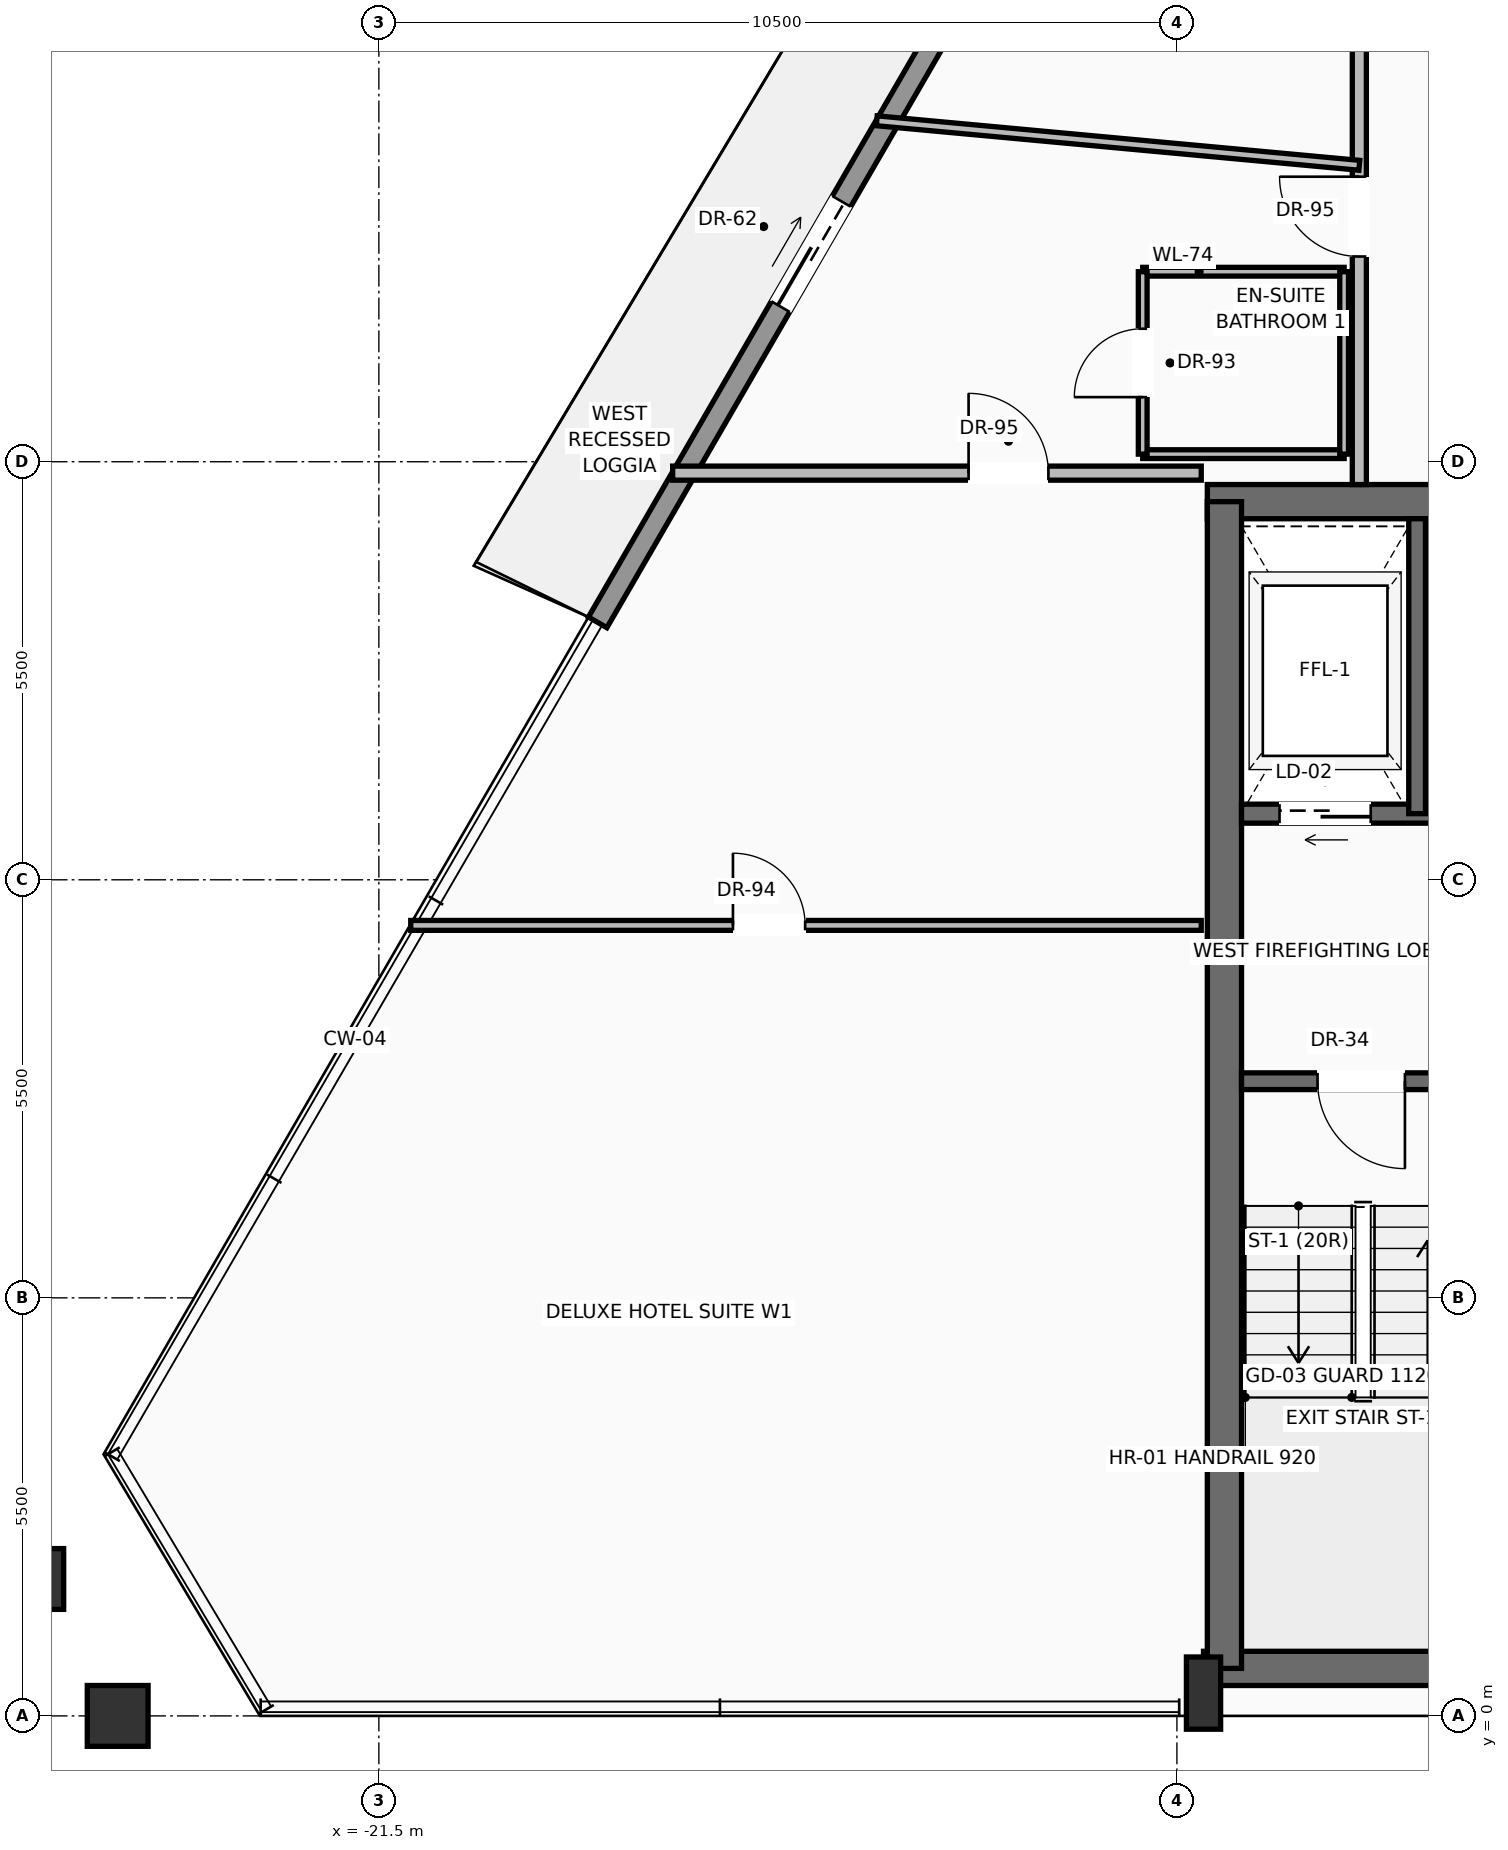
"""IFC4 building model, lengths in metres.
Left out: names, types, materials, properties, quantities, classifications, styles, units other than length and angle.
Written with IfcOpenShell. Run it as: python <this file> out.ifc"""

import sys

from ifc_helpers import new_model, si_unit, direction, frame, frame_2d, origin, origin_2d, place, context, subcontext, project, spatial, rectangle, hollow_rectangle, extrude, source, transform, mapped, element, fill, save


model = new_model("IFC4")
c1 = context("Model", 3, precision=1e-05, world=origin(), true_north=direction((0.0, 1.0)))
c2 = subcontext(c1, "Body", "Model", "MODEL_VIEW")
j1 = project(units=[si_unit("LENGTHUNIT", "METRE"), si_unit("PLANEANGLEUNIT", "RADIAN")], contexts=[c1])
p1 = place(None, origin())
s1 = spatial("IfcSite", under=j1, at=p1, CompositionType="ELEMENT")
p2 = place(p1, origin())
s2 = spatial("IfcBuilding", under=s1, at=p2, CompositionType="ELEMENT")
p3 = place(p2, frame((0.0, 0.0, 269.55)))
s3 = spatial("IfcBuildingStorey", under=s2, at=p3, CompositionType="ELEMENT", Elevation=269.55)
p4 = place(p3, frame((-10.65, 0.625, 0.0), z_axis=(0.0, 0.0, 1.0), x_axis=(1.0, 0.0, 0.0)))
e1 = element("IfcWall", 1, at=p4, inside=s3, PredefinedType="SHEAR", context=c2, shape_type="SweptSolid", body=[
    extrude(rectangle(XDim=21.3, YDim=0.45, at=frame_2d((10.65, 0.0))), origin(), (0.0, 0.0, 1.0), 3.24),
])
p5 = place(p3, frame((-10.6, 15.975, 0.0), z_axis=(0.0, 0.0, 1.0), x_axis=(1.0, 0.0, 0.0)))
e2 = element("IfcWall", 2, at=p5, inside=s3, PredefinedType="SHEAR", context=c2, shape_type="SweptSolid", body=[
    extrude(rectangle(XDim=21.2, YDim=0.45, at=frame_2d((10.6, 0.0))), origin(), (0.0, 0.0, 1.0), 3.24),
])
p6 = place(p5, frame((3.17, 0.0, 0.0)))
e3 = element("IfcOpeningElement", 3, at=p6, cuts=e2, PredefinedType="OPENING", context=c2, shape_type="SweptSolid", body=[
    extrude(rectangle(XDim=1.3, YDim=2.3, at=frame_2d((0.65, 1.15))), frame((0.0, 0.235, 0.0), z_axis=(0.0, -1.0, 0.0), x_axis=(1.0, 0.0, 0.0)), (0.0, 0.0, 1.0), 0.47),
])
p7 = place(p5, frame((9.6, 0.0, 0.0)))
e4 = element("IfcOpeningElement", 4, at=p7, cuts=e2, PredefinedType="OPENING", context=c2, shape_type="SweptSolid", body=[
    extrude(rectangle(XDim=2.0, YDim=2.4, at=frame_2d((1.0, 1.2))), frame((0.0, 0.235, 0.0), z_axis=(0.0, -1.0, 0.0), x_axis=(1.0, 0.0, 0.0)), (0.0, 0.0, 1.0), 0.47),
])
p8 = place(p3, frame((-10.375, 0.625, 0.0), z_axis=(0.0, 0.0, 1.0), x_axis=(0.0, 1.0, 0.0)))
e5 = element("IfcWall", 5, at=p8, inside=s3, PredefinedType="SHEAR", context=c2, shape_type="SweptSolid", body=[
    extrude(rectangle(XDim=15.35, YDim=0.45, at=frame_2d((7.675, 0.0))), origin(), (0.0, 0.0, 1.0), 3.24),
])
m1 = source(origin(), c2, "Body", "SweptSolid", [
    extrude(rectangle(XDim=0.45, YDim=0.95, at=origin_2d()), origin(), (0.0, 0.0, 1.0), 3.45),
])
p9 = place(p3, frame((-10.65, 0.3, 0.0), z_axis=(0.0, 0.0, 1.0), x_axis=(1.0, 0.0, 0.0)))
e6 = element("IfcColumn", 6, at=p9, inside=s3, PredefinedType="PILASTER", context=c2, shape_type="MappedRepresentation", body=[
    mapped(m1, transform((0.0, 0.0, 0.0), scale=1.0)),
])
m2 = source(origin(), c2, "Body", "SweptSolid", [
    extrude(hollow_rectangle(XDim=0.8, YDim=0.8, WallThickness=0.04, at=origin_2d()), origin(), (0.0, 0.0, 1.0), 3.441),
])
p10 = place(p3, frame((-24.936, 0.0, 0.004), z_axis=(0.0003547357, 0.0, 0.999999937081), x_axis=(1.0, 0.0, 0.0)))
e7 = element("IfcColumn", 7, at=p10, inside=s3, PredefinedType="COLUMN", context=c2, shape_type="MappedRepresentation", body=[
    mapped(m2, transform((0.0, 0.0, 0.0), scale=1.0)),
])
m3 = source(origin(), c2, "Body", "SweptSolid", [
    extrude(hollow_rectangle(XDim=0.8, YDim=0.8, WallThickness=0.04, at=origin_2d()), origin(), (0.0, 0.0, 1.0), 3.442),
])
p11 = place(p3, frame((-26.047, 1.801, 0.004), z_axis=(0.011845709499, -0.016598179777, 0.999792068179), x_axis=(0.8139684383, 0.580909099129, 0.0)))
e8 = element("IfcColumn", 8, at=p11, inside=s3, PredefinedType="COLUMN", context=c2, shape_type="MappedRepresentation", body=[
    mapped(m3, transform((0.0, 0.0, 0.0), scale=1.0)),
])
p12 = place(p3, frame((-18.621, 14.387, 0.0), z_axis=(0.0, 0.0, 1.0), x_axis=(0.501208020252, 0.865326828681, 0.0)))
e9 = element("IfcWall", 9, at=p12, inside=s3, PredefinedType="SOLIDWALL", context=c2, shape_type="SweptSolid", body=[
    extrude(rectangle(XDim=20.003, YDim=0.28, at=frame_2d((10.001, 0.0))), origin(), (0.0, 0.0, 1.0), 2.82),
])
p13 = place(p12, frame((4.801, 0.0, 0.0)))
e10 = element("IfcOpeningElement", 10, at=p13, cuts=e9, PredefinedType="OPENING", context=c2, shape_type="SweptSolid", body=[
    extrude(rectangle(XDim=1.6, YDim=2.35, at=frame_2d((0.8, 1.175))), frame((0.0, 0.15, 0.0), z_axis=(0.0, -1.0, 0.0), x_axis=(1.0, 0.0, 0.0)), (0.0, 0.0, 1.0), 0.3),
])
p14 = place(p12, frame((13.602, 0.0, 0.9)))
e11 = element("IfcOpeningElement", 11, at=p14, cuts=e9, PredefinedType="OPENING", context=c2, shape_type="SweptSolid", body=[
    extrude(rectangle(XDim=2.0, YDim=1.75, at=frame_2d((1.0, 0.875))), frame((0.0, 0.15, 0.0), z_axis=(0.0, -1.0, 0.0), x_axis=(1.0, 0.0, 0.0)), (0.0, 0.0, 1.0), 0.3),
])
p15 = place(p3, frame((-5.5, 8.35, 0.0), z_axis=(0.0, 0.0, 1.0), x_axis=(-1.0, 0.0, 0.0)))
e12 = element("IfcWall", 12, at=p15, inside=s3, PredefinedType="SOLIDWALL", context=c2, shape_type="SweptSolid", body=[
    extrude(rectangle(XDim=4.65, YDim=0.22, at=frame_2d((2.325, 0.0))), origin(), (0.0, 0.0, 1.0), 3.24),
])
p16 = place(p15, frame((2.5, 0.0, 0.0)))
e13 = element("IfcOpeningElement", 13, at=p16, cuts=e12, PredefinedType="OPENING", context=c2, shape_type="SweptSolid", body=[
    extrude(rectangle(XDim=1.15, YDim=2.2, at=frame_2d((0.575, 1.1))), frame((0.0, 0.12, 0.0), z_axis=(0.0, -1.0, 0.0), x_axis=(1.0, 0.0, 0.0)), (0.0, 0.0, 1.0), 0.24),
])
p17 = place(p3, frame((-5.5, 11.87, 0.0), z_axis=(0.0, 0.0, 1.0), x_axis=(-1.0, 0.0, 0.0)))
e14 = element("IfcWall", 14, at=p17, inside=s3, PredefinedType="SOLIDWALL", context=c2, shape_type="SweptSolid", body=[
    extrude(rectangle(XDim=4.65, YDim=0.25, at=frame_2d((2.325, 0.0))), origin(), (0.0, 0.0, 1.0), 3.24),
])
p18 = place(p17, frame((2.95, 0.0, 0.0)))
e15 = element("IfcOpeningElement", 15, at=p18, cuts=e14, PredefinedType="OPENING", context=c2, shape_type="SweptSolid", body=[
    extrude(rectangle(XDim=1.2, YDim=2.25, at=frame_2d((0.6, 1.125))), frame((0.0, 0.135, 0.0), z_axis=(0.0, -1.0, 0.0), x_axis=(1.0, 0.0, 0.0)), (0.0, 0.0, 1.0), 0.27),
])
p19 = place(p3, frame((-7.84, 11.87, 0.0), z_axis=(0.0, 0.0, 1.0), x_axis=(0.0, 1.0, 0.0)))
e16 = element("IfcWall", 16, at=p19, inside=s3, PredefinedType="SOLIDWALL", context=c2, shape_type="SweptSolid", body=[
    extrude(rectangle(XDim=3.88, YDim=0.22, at=frame_2d((1.94, 0.0))), origin(), (0.0, 0.0, 1.0), 3.24),
])
p20 = place(p3, frame((-8.6, 16.2, 0.0), z_axis=(0.0, 0.0, 1.0), x_axis=(0.0, 1.0, 0.0)))
e17 = element("IfcWall", 17, at=p20, inside=s3, PredefinedType="PARTITIONING", context=c2, shape_type="SweptSolid", body=[
    extrude(rectangle(XDim=13.8, YDim=0.185, at=frame_2d((6.9, 0.0))), origin(), (0.0, 0.0, 1.0), 3.232),
])
p21 = place(p20, frame((3.0, 0.0, 0.0)))
e18 = element("IfcOpeningElement", 18, at=p21, cuts=e17, PredefinedType="OPENING", context=c2, shape_type="SweptSolid", body=[
    extrude(rectangle(XDim=1.05, YDim=2.25, at=frame_2d((0.525, 1.125))), frame((0.0, 0.103, 0.0), z_axis=(0.0, -1.0, 0.0), x_axis=(1.0, 0.0, 0.0)), (0.0, 0.0, 1.0), 0.205),
])
p22 = place(p20, frame((7.088, 0.0, 0.0)))
e19 = element("IfcOpeningElement", 19, at=p22, cuts=e17, PredefinedType="OPENING", context=c2, shape_type="SweptSolid", body=[
    extrude(rectangle(XDim=1.05, YDim=2.25, at=frame_2d((0.525, 1.125))), frame((0.0, 0.103, 0.0), z_axis=(0.0, -1.0, 0.0), x_axis=(1.0, 0.0, 0.0)), (0.0, 0.0, 1.0), 0.205),
])
p23 = place(p3, frame((-17.635, 16.35, 0.0), z_axis=(0.0, 0.0, 1.0), x_axis=(1.0, 0.0, 0.0)))
e20 = element("IfcWall", 20, at=p23, inside=s3, PredefinedType="PARTITIONING", context=c2, shape_type="SweptSolid", body=[
    extrude(rectangle(XDim=6.955, YDim=0.185, at=frame_2d((3.477, 0.0))), origin(), (0.0, 0.0, 1.0), 3.232),
])
p24 = place(p23, frame((3.893, 0.0, 0.0)))
e21 = element("IfcOpeningElement", 21, at=p24, cuts=e20, PredefinedType="OPENING", context=c2, shape_type="SweptSolid", body=[
    extrude(rectangle(XDim=1.05, YDim=2.25, at=frame_2d((0.525, 1.125))), frame((0.0, 0.103, 0.0), z_axis=(0.0, -1.0, 0.0), x_axis=(1.0, 0.0, 0.0)), (0.0, 0.0, 1.0), 0.205),
])
p25 = place(p3, frame((-21.081, 10.4, 0.0), z_axis=(0.0, 0.0, 1.0), x_axis=(1.0, 0.0, 0.0)))
e22 = element("IfcWall", 22, at=p25, inside=s3, PredefinedType="PARTITIONING", context=c2, shape_type="SweptSolid", body=[
    extrude(rectangle(XDim=10.401, YDim=0.13, at=frame_2d((5.2, 0.0))), origin(), (0.0, 0.0, 1.0), 3.232),
])
p26 = place(p25, frame((4.239, 0.0, 0.0)))
e23 = element("IfcOpeningElement", 23, at=p26, cuts=e22, PredefinedType="OPENING", context=c2, shape_type="SweptSolid", body=[
    extrude(rectangle(XDim=0.95, YDim=2.2, at=frame_2d((0.475, 1.1))), frame((0.0, 0.075, 0.0), z_axis=(0.0, -1.0, 0.0), x_axis=(1.0, 0.0, 0.0)), (0.0, 0.0, 1.0), 0.15),
])
for number, where, z_axis, x_axis in (
    (24, (-11.45, 16.6, 0.0), (0.0, 0.0, 1.0), (1.0, 0.0, 0.0)),
    (25, (-11.45, 19.0, 0.0), (0.0, 0.0, 1.0), (1.0, 0.0, 0.0)),
):
    element("IfcWall", number, at=place(p3, frame(where, z_axis=z_axis, x_axis=x_axis)), inside=s3, PredefinedType="PARTITIONING", context=c2, shape_type="SweptSolid", body=[
        extrude(rectangle(XDim=2.65, YDim=0.115, at=frame_2d((1.325, 0.0))), origin(), (0.0, 0.0, 1.0), 3.232),
    ])
p27 = place(p3, frame((-11.45, 16.6, 0.0), z_axis=(0.0, 0.0, 1.0), x_axis=(0.0, 1.0, 0.0)))
e26 = element("IfcWall", 26, at=p27, inside=s3, PredefinedType="PARTITIONING", context=c2, shape_type="SweptSolid", body=[
    extrude(rectangle(XDim=2.4, YDim=0.115, at=frame_2d((1.2, 0.0))), origin(), (0.0, 0.0, 1.0), 3.232),
])
p28 = place(p27, frame((0.75, 0.0, 0.0)))
e27 = element("IfcOpeningElement", 27, at=p28, cuts=e26, PredefinedType="OPENING", context=c2, shape_type="SweptSolid", body=[
    extrude(rectangle(XDim=0.9, YDim=2.15, at=frame_2d((0.45, 1.075))), frame((0.0, 0.067, 0.0), z_axis=(0.0, -1.0, 0.0), x_axis=(1.0, 0.0, 0.0)), (0.0, 0.0, 1.0), 0.135),
])
p29 = place(p3, frame((-8.8, 16.6, 0.0), z_axis=(0.0, 0.0, 1.0), x_axis=(0.0, 1.0, 0.0)))
e28 = element("IfcWall", 28, at=p29, inside=s3, PredefinedType="PARTITIONING", context=c2, shape_type="SweptSolid", body=[
    extrude(rectangle(XDim=2.4, YDim=0.115, at=frame_2d((1.2, 0.0))), origin(), (0.0, 0.0, 1.0), 3.232),
])
p30 = place(p3, frame((-14.949, 20.986, 0.0), z_axis=(0.0, 0.0, 1.0), x_axis=(0.995772122892, -0.091857929817, 0.0)))
e29 = element("IfcWall", 29, at=p30, inside=s3, PredefinedType="PARTITIONING", context=c2, shape_type="SweptSolid", body=[
    extrude(rectangle(XDim=6.376, YDim=0.13, at=frame_2d((3.188, 0.0))), origin(), (0.0, 0.0, 1.0), 3.232),
])
m4 = source(origin(), c2, "Body", "SweptSolid", [
    extrude(rectangle(XDim=1.6, YDim=2.35, at=frame_2d((0.8, 1.175))), frame((0.0, 0.025, 0.0), z_axis=(0.0, -1.0, 0.0), x_axis=(1.0, 0.0, 0.0)), (0.0, 0.0, 1.0), 0.05),
])
p31 = place(p13, origin())
e30 = element("IfcDoor", 30, at=p31, inside=s3, OperationType="SLIDING_TO_LEFT", PredefinedType="DOOR", context=c2, shape_type="MappedRepresentation", body=[
    mapped(m4, transform((0.0, 0.0, 0.0), scale=1.0)),
])
fill(e10, e30)
m5 = source(origin(), c2, "Body", "SweptSolid", [
    extrude(rectangle(XDim=1.15, YDim=2.2, at=frame_2d((0.575, 1.1))), frame((0.0, 0.025, 0.0), z_axis=(0.0, -1.0, 0.0), x_axis=(1.0, 0.0, 0.0)), (0.0, 0.0, 1.0), 0.05),
])
p32 = place(p16, origin())
e31 = element("IfcDoor", 31, at=p32, inside=s3, OperationType="SINGLE_SWING_LEFT", PredefinedType="DOOR", context=c2, shape_type="MappedRepresentation", body=[
    mapped(m5, transform((0.0, 0.0, 0.0), scale=1.0)),
])
fill(e13, e31)
m6 = source(origin(), c2, "Body", "SweptSolid", [
    extrude(rectangle(XDim=1.2, YDim=2.25, at=frame_2d((0.6, 1.125))), frame((0.0, 0.025, 0.0), z_axis=(0.0, -1.0, 0.0), x_axis=(1.0, 0.0, 0.0)), (0.0, 0.0, 1.0), 0.05),
])
p33 = place(p18, origin())
e32 = element("IfcDoor", 32, at=p33, inside=s3, OperationType="SLIDING_TO_LEFT", PredefinedType="DOOR", context=c2, shape_type="MappedRepresentation", body=[
    mapped(m6, transform((0.0, 0.0, 0.0), scale=1.0)),
])
fill(e15, e32)
m7 = source(origin(), c2, "Body", "SweptSolid", [
    extrude(rectangle(XDim=1.05, YDim=2.25, at=frame_2d((0.525, 1.125))), frame((0.0, 0.025, 0.0), z_axis=(0.0, -1.0, 0.0), x_axis=(1.0, 0.0, 0.0)), (0.0, 0.0, 1.0), 0.05),
])
p34 = place(p24, origin())
e33 = element("IfcDoor", 33, at=p34, inside=s3, OperationType="SINGLE_SWING_LEFT", PredefinedType="DOOR", context=c2, shape_type="MappedRepresentation", body=[
    mapped(m7, transform((0.0, 0.0, 0.0), scale=1.0)),
])
fill(e21, e33)
m8 = source(origin(), c2, "Body", "SweptSolid", [
    extrude(rectangle(XDim=0.95, YDim=2.2, at=frame_2d((0.475, 1.1))), frame((0.0, 0.025, 0.0), z_axis=(0.0, -1.0, 0.0), x_axis=(1.0, 0.0, 0.0)), (0.0, 0.0, 1.0), 0.05),
])
p35 = place(p26, origin())
e34 = element("IfcDoor", 34, at=p35, inside=s3, OperationType="SINGLE_SWING_LEFT", PredefinedType="DOOR", context=c2, shape_type="MappedRepresentation", body=[
    mapped(m8, transform((0.0, 0.0, 0.0), scale=1.0)),
])
fill(e23, e34)
p36 = place(p21, origin())
e35 = element("IfcDoor", 35, at=p36, inside=s3, OperationType="SINGLE_SWING_RIGHT", PredefinedType="DOOR", context=c2, shape_type="MappedRepresentation", body=[
    mapped(m7, transform((0.0, 0.0, 0.0), scale=1.0)),
])
fill(e18, e35)
m9 = source(origin(), c2, "Body", "SweptSolid", [
    extrude(rectangle(XDim=0.9, YDim=2.15, at=frame_2d((0.45, 1.075))), frame((0.0, 0.025, 0.0), z_axis=(0.0, -1.0, 0.0), x_axis=(1.0, 0.0, 0.0)), (0.0, 0.0, 1.0), 0.05),
])
p37 = place(p28, origin())
e36 = element("IfcDoor", 36, at=p37, inside=s3, OperationType="SINGLE_SWING_LEFT", PredefinedType="DOOR", context=c2, shape_type="MappedRepresentation", body=[
    mapped(m9, transform((0.0, 0.0, 0.0), scale=1.0)),
])
fill(e27, e36)
save(model, sys.argv[1])
